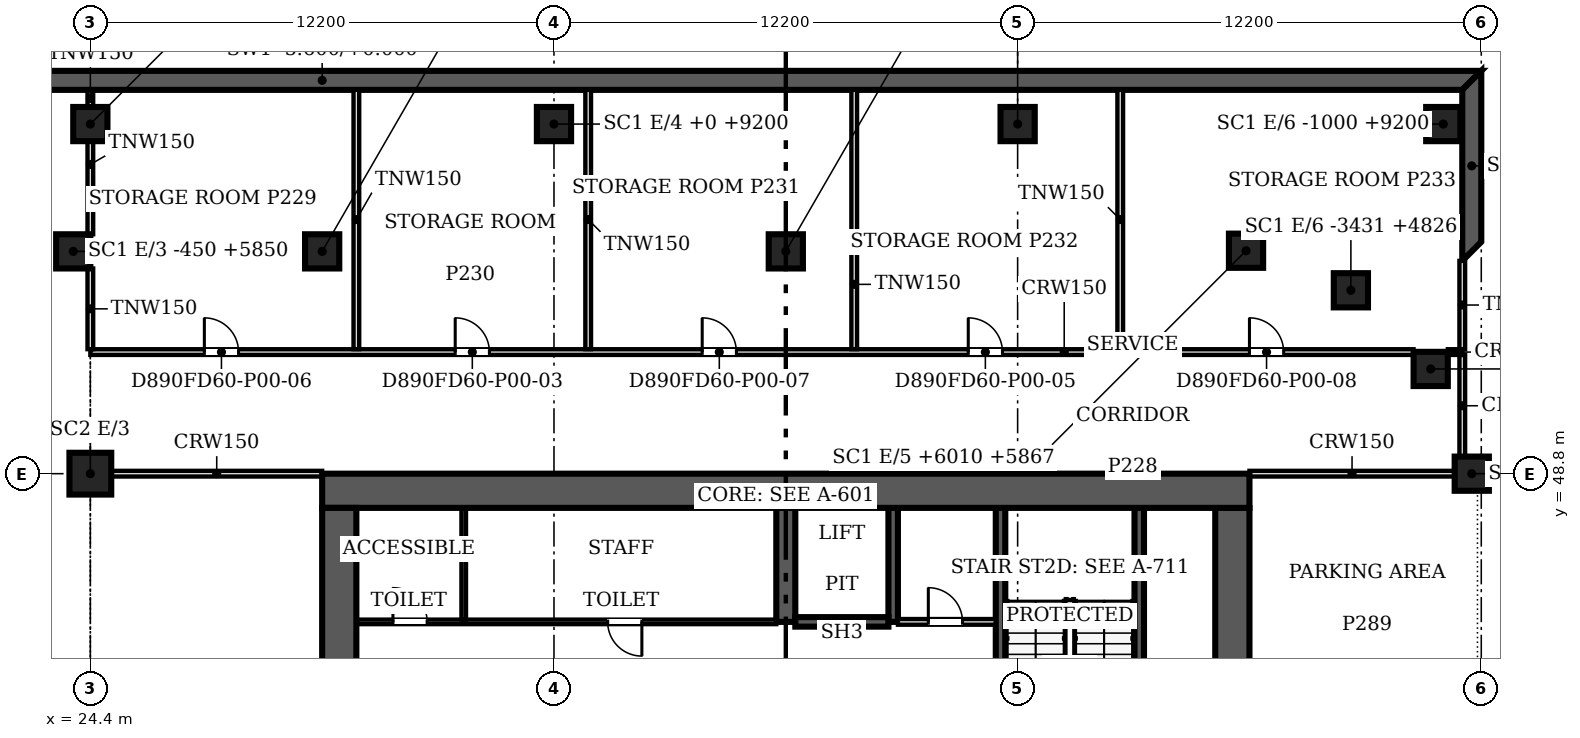
"""IFC4 building model, lengths in metres.
Left out: names, types, materials, properties, quantities, classifications, styles, units other than length and angle.
Written with IfcOpenShell. Run it as: python <this file> out.ifc"""

import sys

from ifc_helpers import new_model, si_unit, direction, frame, frame_2d, origin, origin_2d, place, context, subcontext, project, spatial, polyline, rectangle, outline, extrude, source, transform, mapped, element, fill, save


model = new_model("IFC4")
c1 = context("Model", 3, precision=1e-05, world=origin(), true_north=direction((0.0, 1.0)))
c2 = subcontext(c1, "Body", "Model", "MODEL_VIEW")
j1 = project(units=[si_unit("LENGTHUNIT", "METRE"), si_unit("PLANEANGLEUNIT", "RADIAN")], contexts=[c1])
p1 = place(None, origin())
s1 = spatial("IfcSite", under=j1, at=p1, CompositionType="ELEMENT")
p2 = place(p1, origin())
s2 = spatial("IfcBuilding", under=s1, at=p2, CompositionType="ELEMENT")
p3 = place(p2, frame((0.0, 0.0, -5.4)))
s3 = spatial("IfcBuildingStorey", under=s2, at=p3, CompositionType="ELEMENT", Elevation=-5.4)
p4 = place(p3, frame((0.0, 0.0, -0.2)))
e1 = element("IfcWall", 1, at=p4, inside=s3, PredefinedType="SOLIDWALL", context=c2, shape_type="SweptSolid", body=[
    extrude(outline(polyline([(0.0, 59.4), (0.5, 58.9), (60.5, 58.9), (61.0, 59.4), (0.0, 59.4)])), origin(), (0.0, 0.0, 1.0), 5.6),
])
p5 = place(p3, frame((0.0, 0.0, -0.2)))
e2 = element("IfcWall", 2, at=p5, inside=s3, PredefinedType="SOLIDWALL", context=c2, shape_type="SweptSolid", body=[
    extrude(outline(polyline([(60.5, 54.4), (61.0, 54.9), (61.0, 59.4), (60.5, 58.9), (60.5, 54.4)])), origin(), (0.0, 0.0, 1.0), 5.6),
])
p6 = place(p3, frame((0.0, 0.0, -0.2)))
e3 = element("IfcWall", 3, at=p6, inside=s3, PredefinedType="SOLIDWALL", context=c2, shape_type="SweptSolid", body=[
    extrude(outline(polyline([(60.5, 54.4), (85.9, 54.4), (85.4, 54.9), (61.0, 54.9), (60.5, 54.4)])), origin(), (0.0, 0.0, 1.0), 5.6),
])
for number, where, z_axis, x_axis in (
    (4, (23.95, 54.65, 0.0), (0.0, 0.0, 1.0), (1.0, 0.0, 0.0)),
    (5, (60.75, 48.8, 0.0), (0.0, 0.0, 1.0), (1.0, 0.0, 0.0)),
    (6, (59.669, 51.556, 0.0), (0.0, 0.0, 1.0), (1.0, 0.0, 0.0)),
    (7, (57.569, 53.626, 0.0), (0.0, 0.0, 1.0), (1.0, 0.0, 0.0)),
    (8, (54.81, 54.667, 0.0), (0.0, 0.0, 1.0), (1.0, 0.0, 0.0)),
    (9, (42.7, 54.65, 0.0), (0.0, 0.0, 1.0), (1.0, 0.0, 0.0)),
    (10, (30.5, 54.65, 0.0), (0.0, 0.0, 1.0), (1.0, 0.0, 0.0)),
):
    element("IfcColumn", number, at=place(p3, frame(where, z_axis=z_axis, x_axis=x_axis)), inside=s3, PredefinedType="COLUMN", context=c2, shape_type="SweptSolid", body=[
        extrude(rectangle(XDim=0.9, YDim=0.9, at=origin_2d()), origin(), (0.0, 0.0, 1.0), 5.15),
    ])
p7 = place(p3, frame((24.4, 48.8, 0.0), z_axis=(0.0, 0.0, 1.0), x_axis=(1.0, 0.0, 0.0)))
e11 = element("IfcColumn", 11, at=p7, inside=s3, PredefinedType="COLUMN", context=c2, shape_type="SweptSolid", body=[
    extrude(rectangle(XDim=1.1, YDim=1.1, at=origin_2d()), origin(), (0.0, 0.0, 1.0), 5.15),
])
for number, where, z_axis, x_axis in (
    (12, (24.4, 58.0, 0.0), (0.0, 0.0, 1.0), (1.0, 0.0, 0.0)),
    (13, (36.6, 58.0, 0.0), (0.0, 0.0, 1.0), (1.0, 0.0, 0.0)),
    (14, (48.8, 58.0, 0.0), (0.0, 0.0, 1.0), (1.0, 0.0, 0.0)),
    (15, (61.0, 54.2, 0.0), (0.0, 0.0, 1.0), (1.0, 0.0, 0.0)),
    (16, (60.0, 58.0, 0.0), (0.0, 0.0, 1.0), (1.0, 0.0, 0.0)),
):
    element("IfcColumn", number, at=place(p3, frame(where, z_axis=z_axis, x_axis=x_axis)), inside=s3, PredefinedType="COLUMN", context=c2, shape_type="SweptSolid", body=[
        extrude(rectangle(XDim=0.9, YDim=0.9, at=origin_2d()), origin(), (0.0, 0.0, 1.0), 5.15),
    ])
p8 = place(p3, frame((30.95, 25.3, 0.0), z_axis=(0.0, 0.0, 1.0), x_axis=(0.0, 1.0, 0.0)))
e17 = element("IfcWall", 17, at=p8, inside=s3, PredefinedType="SHEAR", context=c2, shape_type="SweptSolid", body=[
    extrude(rectangle(XDim=22.6, YDim=0.9, at=frame_2d((11.3, 0.0))), origin(), (0.0, 0.0, 1.0), 5.4),
])
m1 = source(origin(), c2, "Body", "SweptSolid", [
    extrude(rectangle(XDim=2.1, YDim=2.4, at=frame_2d((1.05, 1.2))), frame((0.0, 0.46, 0.0), z_axis=(0.0, -1.0, 0.0), x_axis=(1.0, 0.0, 0.0)), (0.0, 0.0, 1.0), 0.92),
])
p9 = place(p8, frame((4.5, 0.0, 0.0)))
e18 = element("IfcOpeningElement", 18, at=p9, cuts=e17, PredefinedType="OPENING", context=c2, shape_type="MappedRepresentation", body=[
    mapped(m1, transform((0.0, 0.0, 0.0), scale=1.0)),
])
p10 = place(p8, frame((16.0, 0.0, 0.0)))
e19 = element("IfcOpeningElement", 19, at=p10, cuts=e17, PredefinedType="OPENING", context=c2, shape_type="MappedRepresentation", body=[
    mapped(m1, transform((0.0, 0.0, 0.0), scale=1.0)),
])
p11 = place(p3, frame((30.5, 48.35, 0.0), z_axis=(0.0, 0.0, 1.0), x_axis=(1.0, 0.0, 0.0)))
e20 = element("IfcWall", 20, at=p11, inside=s3, PredefinedType="SHEAR", context=c2, shape_type="SweptSolid", body=[
    extrude(rectangle(XDim=24.4, YDim=0.9, at=frame_2d((12.2, 0.0))), origin(), (0.0, 0.0, 1.0), 5.4),
])
p12 = place(p3, frame((54.45, 47.9, 0.0), z_axis=(0.0, 0.0, 1.0), x_axis=(0.0, -1.0, 0.0)))
e21 = element("IfcWall", 21, at=p12, inside=s3, PredefinedType="SHEAR", context=c2, shape_type="SweptSolid", body=[
    extrude(rectangle(XDim=22.6, YDim=0.9, at=frame_2d((11.3, 0.0))), origin(), (0.0, 0.0, 1.0), 5.4),
])
m2 = source(origin(), c2, "Body", "SweptSolid", [
    extrude(rectangle(XDim=1.2, YDim=2.1, at=frame_2d((0.6, 1.05))), frame((0.0, 0.46, 0.0), z_axis=(0.0, -1.0, 0.0), x_axis=(1.0, 0.0, 0.0)), (0.0, 0.0, 1.0), 0.92),
])
p13 = place(p12, frame((4.6, 0.0, 0.0)))
e22 = element("IfcOpeningElement", 22, at=p13, cuts=e21, PredefinedType="OPENING", context=c2, shape_type="MappedRepresentation", body=[
    mapped(m2, transform((0.0, 0.0, 0.0), scale=1.0)),
])
p14 = place(p3, frame((42.7, 44.9, 0.0), z_axis=(0.0, 0.0, 1.0), x_axis=(0.0, 1.0, 0.0)))
e23 = element("IfcWall", 23, at=p14, inside=s3, PredefinedType="SHEAR", context=c2, shape_type="SweptSolid", body=[
    extrude(rectangle(XDim=3.0, YDim=0.5, at=frame_2d((1.5, 0.0))), origin(), (0.0, 0.0, 1.0), 5.4),
])
p15 = place(p3, frame((48.35, 47.9, 0.0), z_axis=(0.0, 0.0, 1.0), x_axis=(0.0, -1.0, 0.0)))
e24 = element("IfcWall", 24, at=p15, inside=s3, PredefinedType="SOLIDWALL", context=c2, shape_type="SweptSolid", body=[
    extrude(rectangle(XDim=11.05, YDim=0.25, at=frame_2d((5.525, 0.0))), origin(), (0.0, 0.0, 1.0), 5.4),
])
m3 = source(origin(), c2, "Body", "SweptSolid", [
    extrude(rectangle(XDim=1.2, YDim=2.1, at=frame_2d((0.6, 1.05))), frame((0.0, 0.135, 0.0), z_axis=(0.0, -1.0, 0.0), x_axis=(1.0, 0.0, 0.0)), (0.0, 0.0, 1.0), 0.27),
])
p16 = place(p15, frame((6.625, 0.0, 0.0)))
e25 = element("IfcOpeningElement", 25, at=p16, cuts=e24, PredefinedType="OPENING", context=c2, shape_type="MappedRepresentation", body=[
    mapped(m3, transform((0.0, 0.0, 0.0), scale=1.0)),
])
p17 = place(p3, frame((52.0, 39.925, 0.0), z_axis=(0.0, 0.0, 1.0), x_axis=(0.0, 1.0, 0.0)))
e26 = element("IfcWall", 26, at=p17, inside=s3, PredefinedType="SOLIDWALL", context=c2, shape_type="SweptSolid", body=[
    extrude(rectangle(XDim=7.975, YDim=0.25, at=frame_2d((3.987, 0.0))), origin(), (0.0, 0.0, 1.0), 5.4),
])
p18 = place(p17, frame((0.15, 0.0, 0.0)))
e27 = element("IfcOpeningElement", 27, at=p18, cuts=e26, PredefinedType="OPENING", context=c2, shape_type="MappedRepresentation", body=[
    mapped(m3, transform((0.0, 0.0, 0.0), scale=1.0)),
])
p19 = place(p3, frame((45.525, 44.9, 0.0), z_axis=(0.0, 0.0, 1.0), x_axis=(0.0, 1.0, 0.0)))
e28 = element("IfcWall", 28, at=p19, inside=s3, PredefinedType="SOLIDWALL", context=c2, shape_type="SweptSolid", body=[
    extrude(rectangle(XDim=3.0, YDim=0.25, at=frame_2d((1.5, 0.0))), origin(), (0.0, 0.0, 1.0), 5.4),
])
p20 = place(p3, frame((42.95, 44.9, 0.0), z_axis=(0.0, 0.0, 1.0), x_axis=(1.0, 0.0, 0.0)))
e29 = element("IfcWall", 29, at=p20, inside=s3, PredefinedType="SOLIDWALL", context=c2, shape_type="SweptSolid", body=[
    extrude(rectangle(XDim=2.45, YDim=0.25, at=frame_2d((1.225, 0.0))), origin(), (0.0, 0.0, 1.0), 5.4),
])
p21 = place(p3, frame((31.4, 44.9, 0.0), z_axis=(0.0, 0.0, 1.0), x_axis=(1.0, 0.0, 0.0)))
e30 = element("IfcWall", 30, at=p21, inside=s3, PredefinedType="PARTITIONING", context=c2, shape_type="SweptSolid", body=[
    extrude(rectangle(XDim=11.05, YDim=0.12, at=frame_2d((5.525, 0.0))), origin(), (0.0, 0.0, 1.0), 5.15),
])
m4 = source(origin(), c2, "Body", "SweptSolid", [
    extrude(rectangle(XDim=0.9, YDim=2.1, at=frame_2d((0.45, 1.05))), frame((0.0, 0.07, 0.0), z_axis=(0.0, -1.0, 0.0), x_axis=(1.0, 0.0, 0.0)), (0.0, 0.0, 1.0), 0.14),
])
p22 = place(p21, frame((0.962, 0.0, 0.0)))
e31 = element("IfcOpeningElement", 31, at=p22, cuts=e30, PredefinedType="OPENING", context=c2, shape_type="MappedRepresentation", body=[
    mapped(m4, transform((0.0, 0.0, 0.0), scale=1.0)),
])
p23 = place(p21, frame((6.613, 0.0, 0.0)))
e32 = element("IfcOpeningElement", 32, at=p23, cuts=e30, PredefinedType="OPENING", context=c2, shape_type="MappedRepresentation", body=[
    mapped(m4, transform((0.0, 0.0, 0.0), scale=1.0)),
])
p24 = place(p3, frame((34.225, 44.96, 0.0), z_axis=(0.0, 0.0, 1.0), x_axis=(0.0, 1.0, 0.0)))
e33 = element("IfcWall", 33, at=p24, inside=s3, PredefinedType="PARTITIONING", context=c2, shape_type="SweptSolid", body=[
    extrude(rectangle(XDim=2.94, YDim=0.12, at=frame_2d((1.47, 0.0))), origin(), (0.0, 0.0, 1.0), 5.15),
])
p25 = place(p3, frame((45.65, 44.9, 0.0), z_axis=(0.0, 0.0, 1.0), x_axis=(1.0, 0.0, 0.0)))
e34 = element("IfcWall", 34, at=p25, inside=s3, PredefinedType="PARTITIONING", context=c2, shape_type="SweptSolid", body=[
    extrude(rectangle(XDim=2.575, YDim=0.15, at=frame_2d((1.288, 0.0))), origin(), (0.0, 0.0, 1.0), 5.15),
])
m5 = source(origin(), c2, "Body", "SweptSolid", [
    extrude(rectangle(XDim=0.9, YDim=2.1, at=frame_2d((0.45, 1.05))), frame((0.0, 0.085, 0.0), z_axis=(0.0, -1.0, 0.0), x_axis=(1.0, 0.0, 0.0)), (0.0, 0.0, 1.0), 0.17),
])
p26 = place(p25, frame((0.8, 0.0, 0.0)))
e35 = element("IfcOpeningElement", 35, at=p26, cuts=e34, PredefinedType="OPENING", context=c2, shape_type="MappedRepresentation", body=[
    mapped(m5, transform((0.0, 0.0, 0.0), scale=1.0)),
])
p27 = place(p3, frame((61.0, 42.101, 0.0), z_axis=(0.0, 0.0, 1.0), x_axis=(0.0, 1.0, 0.0)))
e36 = element("IfcWall", 36, at=p27, inside=s3, PredefinedType="PARTITIONING", context=c2, shape_type="SweptSolid", body=[
    extrude(rectangle(XDim=6.248, YDim=0.2, at=frame_2d((3.124, 0.0))), origin(), (0.0, 0.0, 1.0), 4.315),
])
p28 = place(p3, frame((24.951, 48.8, 0.0), z_axis=(0.0, 0.0, 1.0), x_axis=(1.0, 0.0, 0.0)))
e37 = element("IfcWall", 37, at=p28, inside=s3, PredefinedType="PARTITIONING", context=c2, shape_type="SweptSolid", body=[
    extrude(rectangle(XDim=5.549, YDim=0.15, at=frame_2d((2.774, 0.0))), origin(), (0.0, 0.0, 1.0), 4.315),
])
p29 = place(p3, frame((54.9, 48.8, 0.0), z_axis=(0.0, 0.0, 1.0), x_axis=(1.0, 0.0, 0.0)))
e38 = element("IfcWall", 38, at=p29, inside=s3, PredefinedType="PARTITIONING", context=c2, shape_type="SweptSolid", body=[
    extrude(rectangle(XDim=5.399, YDim=0.15, at=frame_2d((2.7, 0.0))), origin(), (0.0, 0.0, 1.0), 4.315),
])
p30 = place(p3, frame((61.201, 48.8, 0.0), z_axis=(0.0, 0.0, 1.0), x_axis=(1.0, 0.0, 0.0)))
e39 = element("IfcWall", 39, at=p30, inside=s3, PredefinedType="PARTITIONING", context=c2, shape_type="SweptSolid", body=[
    extrude(rectangle(XDim=11.548, YDim=0.2, at=frame_2d((5.774, 0.0))), origin(), (0.0, 0.0, 1.0), 4.315),
])
p31 = place(p3, frame((60.5, 49.251, 0.0), z_axis=(0.0, 0.0, 1.0), x_axis=(0.0, 1.0, 0.0)))
e40 = element("IfcWall", 40, at=p31, inside=s3, PredefinedType="PARTITIONING", context=c2, shape_type="SweptSolid", body=[
    extrude(rectangle(XDim=2.673, YDim=0.15, at=frame_2d((1.336, 0.0))), origin(), (0.0, 0.0, 1.0), 4.315),
])
p32 = place(p3, frame((61.0, 49.251, 0.0), z_axis=(0.0, 0.0, 1.0), x_axis=(0.0, 1.0, 0.0)))
e41 = element("IfcWall", 41, at=p32, inside=s3, PredefinedType="PARTITIONING", context=c2, shape_type="SweptSolid", body=[
    extrude(rectangle(XDim=2.473, YDim=0.15, at=frame_2d((1.237, 0.0))), origin(), (0.0, 0.0, 1.0), 4.315),
])
p33 = place(p3, frame((61.0, 51.8, 0.0), z_axis=(0.0, 0.0, 1.0), x_axis=(1.0, 0.0, 0.0)))
e42 = element("IfcWall", 42, at=p33, inside=s3, PredefinedType="PARTITIONING", context=c2, shape_type="SweptSolid", body=[
    extrude(rectangle(XDim=24.4, YDim=0.15, at=frame_2d((12.2, 0.0))), origin(), (0.0, 0.0, 1.0), 4.315),
])
p34 = place(p3, frame((24.4, 52.0, 0.0), z_axis=(0.0, 0.0, 1.0), x_axis=(1.0, 0.0, 0.0)))
e43 = element("IfcWall", 43, at=p34, inside=s3, PredefinedType="PARTITIONING", context=c2, shape_type="SweptSolid", body=[
    extrude(rectangle(XDim=34.818, YDim=0.15, at=frame_2d((17.409, 0.0))), origin(), (0.0, 0.0, 1.0), 4.315),
])
p35 = place(p34, frame((9.601, 0.0, 0.0)))
e44 = element("IfcOpeningElement", 44, at=p35, cuts=e43, PredefinedType="OPENING", context=c2, shape_type="MappedRepresentation", body=[
    mapped(m5, transform((0.0, 0.0, 0.0), scale=1.0)),
])
p36 = place(p34, frame((23.101, 0.0, 0.0)))
e45 = element("IfcOpeningElement", 45, at=p36, cuts=e43, PredefinedType="OPENING", context=c2, shape_type="MappedRepresentation", body=[
    mapped(m5, transform((0.0, 0.0, 0.0), scale=1.0)),
])
p37 = place(p34, frame((3.0, 0.0, 0.0)))
e46 = element("IfcOpeningElement", 46, at=p37, cuts=e43, PredefinedType="OPENING", context=c2, shape_type="MappedRepresentation", body=[
    mapped(m5, transform((0.0, 0.0, 0.0), scale=1.0)),
])
p38 = place(p34, frame((16.1, 0.0, 0.0)))
e47 = element("IfcOpeningElement", 47, at=p38, cuts=e43, PredefinedType="OPENING", context=c2, shape_type="MappedRepresentation", body=[
    mapped(m5, transform((0.0, 0.0, 0.0), scale=1.0)),
])
p39 = place(p34, frame((30.5, 0.0, 0.0)))
e48 = element("IfcOpeningElement", 48, at=p39, cuts=e43, PredefinedType="OPENING", context=c2, shape_type="MappedRepresentation", body=[
    mapped(m5, transform((0.0, 0.0, 0.0), scale=1.0)),
])
p40 = place(p3, frame((60.12, 52.0, 0.0), z_axis=(0.0, 0.0, 1.0), x_axis=(1.0, 0.0, 0.0)))
e49 = element("IfcWall", 49, at=p40, inside=s3, PredefinedType="PARTITIONING", context=c2, shape_type="SweptSolid", body=[
    extrude(rectangle(XDim=0.38, YDim=0.15, at=frame_2d((0.19, 0.0))), origin(), (0.0, 0.0, 1.0), 4.315),
])
p41 = place(p3, frame((24.4, 52.076, 0.0), z_axis=(0.0, 0.0, 1.0), x_axis=(0.0, 1.0, 0.0)))
e50 = element("IfcWall", 50, at=p41, inside=s3, PredefinedType="PARTITIONING", context=c2, shape_type="SweptSolid", body=[
    extrude(rectangle(XDim=2.123, YDim=0.15, at=frame_2d((1.062, 0.0))), origin(), (0.0, 0.0, 1.0), 4.315),
])
for number, where, z_axis, x_axis in (
    (51, (31.4, 52.076, 0.0), (0.0, 0.0, 1.0), (0.0, 1.0, 0.0)),
    (52, (37.5, 52.076, 0.0), (0.0, 0.0, 1.0), (0.0, 1.0, 0.0)),
    (53, (44.5, 52.076, 0.0), (0.0, 0.0, 1.0), (0.0, 1.0, 0.0)),
    (54, (51.5, 52.076, 0.0), (0.0, 0.0, 1.0), (0.0, 1.0, 0.0)),
):
    element("IfcWall", number, at=place(p3, frame(where, z_axis=z_axis, x_axis=x_axis)), inside=s3, PredefinedType="PARTITIONING", context=c2, shape_type="SweptSolid", body=[
        extrude(rectangle(XDim=6.824, YDim=0.15, at=frame_2d((3.412, 0.0))), origin(), (0.0, 0.0, 1.0), 4.315),
    ])
p42 = place(p3, frame((60.5, 52.076, 0.0), z_axis=(0.0, 0.0, 1.0), x_axis=(0.0, 1.0, 0.0)))
e55 = element("IfcWall", 55, at=p42, inside=s3, PredefinedType="PARTITIONING", context=c2, shape_type="SweptSolid", body=[
    extrude(rectangle(XDim=2.324, YDim=0.15, at=frame_2d((1.162, 0.0))), origin(), (0.0, 0.0, 1.0), 4.315),
])
p43 = place(p3, frame((24.4, 55.101, 0.0), z_axis=(0.0, 0.0, 1.0), x_axis=(0.0, 1.0, 0.0)))
e56 = element("IfcWall", 56, at=p43, inside=s3, PredefinedType="PARTITIONING", context=c2, shape_type="SweptSolid", body=[
    extrude(rectangle(XDim=2.448, YDim=0.15, at=frame_2d((1.224, 0.0))), origin(), (0.0, 0.0, 1.0), 4.315),
])
p44 = place(p3, frame((24.4, 58.451, 0.0), z_axis=(0.0, 0.0, 1.0), x_axis=(0.0, 1.0, 0.0)))
e57 = element("IfcWall", 57, at=p44, inside=s3, PredefinedType="PARTITIONING", context=c2, shape_type="SweptSolid", body=[
    extrude(rectangle(XDim=0.449, YDim=0.15, at=frame_2d((0.225, 0.0))), origin(), (0.0, 0.0, 1.0), 4.315),
])
m6 = source(origin(), c2, "Body", "SweptSolid", [
    extrude(rectangle(XDim=0.9, YDim=2.1, at=frame_2d((0.45, 1.05))), frame((0.0, 0.025, 0.0), z_axis=(0.0, -1.0, 0.0), x_axis=(1.0, 0.0, 0.0)), (0.0, 0.0, 1.0), 0.05),
])
p45 = place(p22, origin())
e58 = element("IfcDoor", 58, at=p45, inside=s3, OperationType="SINGLE_SWING_LEFT", PredefinedType="DOOR", context=c2, shape_type="MappedRepresentation", body=[
    mapped(m6, transform((0.0, 0.0, 0.0), scale=1.0)),
])
fill(e31, e58)
p46 = place(p23, origin())
e59 = element("IfcDoor", 59, at=p46, inside=s3, OperationType="SINGLE_SWING_RIGHT", PredefinedType="DOOR", context=c2, shape_type="MappedRepresentation", body=[
    mapped(m6, transform((0.0, 0.0, 0.0), scale=1.0)),
])
fill(e32, e59)
p47 = place(p26, origin())
e60 = element("IfcDoor", 60, at=p47, inside=s3, OperationType="SINGLE_SWING_LEFT", PredefinedType="DOOR", context=c2, shape_type="MappedRepresentation", body=[
    mapped(m6, transform((0.0, 0.0, 0.0), scale=1.0)),
])
fill(e35, e60)
p48 = place(p35, origin())
e61 = element("IfcDoor", 61, at=p48, inside=s3, OperationType="SINGLE_SWING_LEFT", PredefinedType="DOOR", context=c2, shape_type="MappedRepresentation", body=[
    mapped(m6, transform((0.0, 0.0, 0.0), scale=1.0)),
])
fill(e44, e61)
p49 = place(p36, origin())
e62 = element("IfcDoor", 62, at=p49, inside=s3, OperationType="SINGLE_SWING_LEFT", PredefinedType="DOOR", context=c2, shape_type="MappedRepresentation", body=[
    mapped(m6, transform((0.0, 0.0, 0.0), scale=1.0)),
])
fill(e45, e62)
p50 = place(p37, origin())
e63 = element("IfcDoor", 63, at=p50, inside=s3, OperationType="SINGLE_SWING_LEFT", PredefinedType="DOOR", context=c2, shape_type="MappedRepresentation", body=[
    mapped(m6, transform((0.0, 0.0, 0.0), scale=1.0)),
])
fill(e46, e63)
p51 = place(p38, origin())
e64 = element("IfcDoor", 64, at=p51, inside=s3, OperationType="SINGLE_SWING_LEFT", PredefinedType="DOOR", context=c2, shape_type="MappedRepresentation", body=[
    mapped(m6, transform((0.0, 0.0, 0.0), scale=1.0)),
])
fill(e47, e64)
p52 = place(p39, origin())
e65 = element("IfcDoor", 65, at=p52, inside=s3, OperationType="SINGLE_SWING_LEFT", PredefinedType="DOOR", context=c2, shape_type="MappedRepresentation", body=[
    mapped(m6, transform((0.0, 0.0, 0.0), scale=1.0)),
])
fill(e48, e65)
save(model, sys.argv[1])
